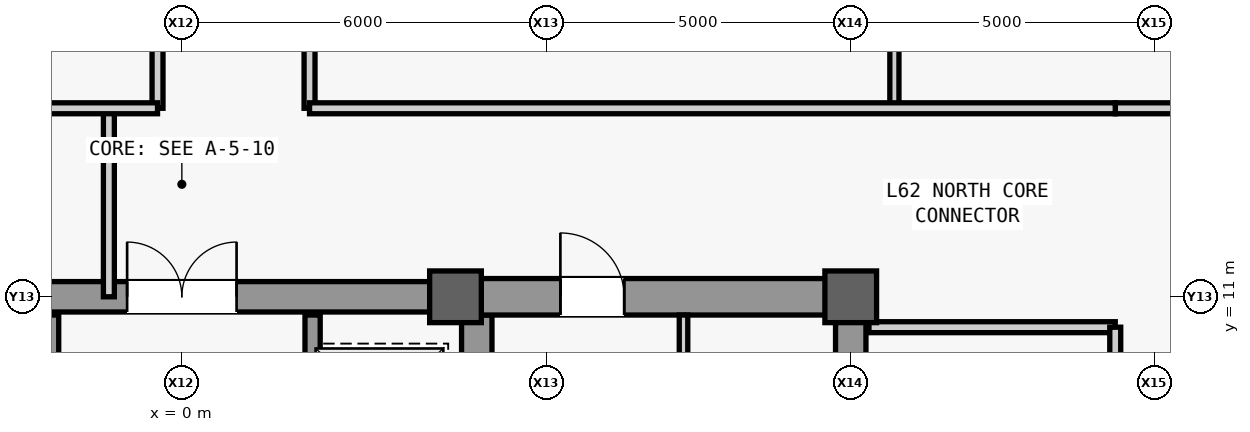
"""IFC4 building model, lengths in metres.
Left out: names, types, materials, properties, quantities, classifications, styles, units other than length and angle.
Written with IfcOpenShell. Run it as: python <this file> out.ifc"""

import sys

from ifc_helpers import new_model, si_unit, direction, frame, frame_2d, origin, origin_2d, place, context, subcontext, project, spatial, rectangle, extrude, source, transform, mapped, element, fill, save


model = new_model("IFC4")
c1 = context("Model", 3, precision=1e-05, world=origin(), true_north=direction((0.0, 1.0)))
c2 = subcontext(c1, "Body", "Model", "MODEL_VIEW")
j1 = project(units=[si_unit("LENGTHUNIT", "METRE"), si_unit("PLANEANGLEUNIT", "RADIAN")], contexts=[c1])
p1 = place(None, origin())
s1 = spatial("IfcSite", under=j1, at=p1, CompositionType="ELEMENT")
p2 = place(p1, origin())
s2 = spatial("IfcBuilding", under=s1, at=p2, CompositionType="ELEMENT")
p3 = place(p2, frame((0.0, 0.0, 263.1)))
s3 = spatial("IfcBuildingStorey", under=s2, at=p3, CompositionType="ELEMENT", Elevation=263.1)
m1 = source(origin(), c2, "Body", "SweptSolid", [
    extrude(rectangle(XDim=22.0, YDim=0.5, at=frame_2d((11.0, 0.0))), origin(), (0.0, 0.0, 1.0), 4.6),
])
p4 = place(p3, frame((11.0, -11.0, 0.0), z_axis=(0.0, 0.0, 1.0), x_axis=(0.0, 1.0, 0.0)))
e1 = element("IfcWall", 1, at=p4, inside=s3, PredefinedType="SHEAR", context=c2, shape_type="MappedRepresentation", body=[
    mapped(m1, transform((0.0, 0.0, 0.0), scale=1.0)),
])
m2 = source(origin(), c2, "Body", "SweptSolid", [
    extrude(rectangle(XDim=1.1, YDim=2.2, at=frame_2d((0.55, 1.1))), frame((0.0, 0.26, 0.0), z_axis=(0.0, -1.0, 0.0), x_axis=(1.0, 0.0, 0.0)), (0.0, 0.0, 1.0), 0.52),
])
p5 = place(p4, frame((0.8, 0.0, 0.0)))
e2 = element("IfcOpeningElement", 2, at=p5, cuts=e1, PredefinedType="OPENING", context=c2, shape_type="MappedRepresentation", body=[
    mapped(m2, transform((0.0, 0.0, 0.0), scale=1.0)),
])
m3 = source(origin(), c2, "Body", "SweptSolid", [
    extrude(rectangle(XDim=0.9, YDim=2.15, at=frame_2d((0.45, 1.075))), frame((0.0, 0.26, 0.0), z_axis=(0.0, -1.0, 0.0), x_axis=(1.0, 0.0, 0.0)), (0.0, 0.0, 1.0), 0.52),
])
p6 = place(p4, frame((6.85, 0.0, 0.0)))
e3 = element("IfcOpeningElement", 3, at=p6, cuts=e1, PredefinedType="OPENING", context=c2, shape_type="MappedRepresentation", body=[
    mapped(m3, transform((0.0, 0.0, 0.0), scale=1.0)),
])
m4 = source(origin(), c2, "Body", "SweptSolid", [
    extrude(rectangle(XDim=1.2, YDim=2.3, at=frame_2d((0.6, 1.15))), frame((0.0, 0.26, 0.0), z_axis=(0.0, -1.0, 0.0), x_axis=(1.0, 0.0, 0.0)), (0.0, 0.0, 1.0), 0.52),
])
p7 = place(p4, frame((17.6, 0.0, 0.0)))
e4 = element("IfcOpeningElement", 4, at=p7, cuts=e1, PredefinedType="OPENING", context=c2, shape_type="MappedRepresentation", body=[
    mapped(m4, transform((0.0, 0.0, 0.0), scale=1.0)),
])
p8 = place(p4, frame((19.6, 0.0, 0.0)))
e5 = element("IfcOpeningElement", 5, at=p8, cuts=e1, PredefinedType="OPENING", context=c2, shape_type="MappedRepresentation", body=[
    mapped(m4, transform((0.0, 0.0, 0.0), scale=1.0)),
])
m5 = source(origin(), c2, "Body", "SweptSolid", [
    extrude(rectangle(XDim=1.3, YDim=2.3, at=frame_2d((0.65, 1.15))), frame((0.0, 0.26, 0.0), z_axis=(0.0, -1.0, 0.0), x_axis=(1.0, 0.0, 0.0)), (0.0, 0.0, 1.0), 0.52),
])
p9 = place(p4, frame((2.7, 0.0, 0.0)))
e6 = element("IfcOpeningElement", 6, at=p9, cuts=e1, PredefinedType="OPENING", context=c2, shape_type="MappedRepresentation", body=[
    mapped(m5, transform((0.0, 0.0, 0.0), scale=1.0)),
])
p10 = place(p4, frame((13.35, 0.0, 0.0)))
e7 = element("IfcOpeningElement", 7, at=p10, cuts=e1, PredefinedType="OPENING", context=c2, shape_type="MappedRepresentation", body=[
    mapped(m5, transform((0.0, 0.0, 0.0), scale=1.0)),
])
m6 = source(origin(), c2, "Body", "SweptSolid", [
    extrude(rectangle(XDim=21.4, YDim=0.5, at=frame_2d((10.7, 0.0))), origin(), (0.0, 0.0, 1.0), 4.6),
])
p11 = place(p3, frame((4.85, -10.7, 0.0), z_axis=(0.0, 0.0, 1.0), x_axis=(0.0, 1.0, 0.0)))
e8 = element("IfcWall", 8, at=p11, inside=s3, PredefinedType="SHEAR", context=c2, shape_type="MappedRepresentation", body=[
    mapped(m6, transform((0.0, 0.0, 0.0), scale=1.0)),
])
m7 = source(origin(), c2, "Body", "SweptSolid", [
    extrude(rectangle(XDim=5.9, YDim=0.6, at=frame_2d((2.95, 0.0))), origin(), (0.0, 0.0, 1.0), 4.6),
])
p12 = place(p3, frame((4.85, 11.0, 0.0), z_axis=(0.0, 0.0, 1.0), x_axis=(1.0, 0.0, 0.0)))
e9 = element("IfcWall", 9, at=p12, inside=s3, PredefinedType="SHEAR", context=c2, shape_type="MappedRepresentation", body=[
    mapped(m7, transform((0.0, 0.0, 0.0), scale=1.0)),
])
m8 = source(origin(), c2, "Body", "SweptSolid", [
    extrude(rectangle(XDim=1.05, YDim=2.2, at=frame_2d((0.525, 1.1))), frame((0.0, 0.31, 0.0), z_axis=(0.0, -1.0, 0.0), x_axis=(1.0, 0.0, 0.0)), (0.0, 0.0, 1.0), 0.62),
])
p13 = place(p12, frame((1.375, 0.0, 0.0)))
e10 = element("IfcOpeningElement", 10, at=p13, cuts=e9, PredefinedType="OPENING", context=c2, shape_type="MappedRepresentation", body=[
    mapped(m8, transform((0.0, 0.0, 0.0), scale=1.0)),
])
m9 = source(origin(), c2, "Body", "SweptSolid", [
    extrude(rectangle(XDim=9.2, YDim=0.5, at=frame_2d((4.6, 0.0))), origin(), (0.0, 0.0, 1.0), 4.6),
])
p14 = place(p3, frame((-4.6, 11.0, 0.0), z_axis=(0.0, 0.0, 1.0), x_axis=(1.0, 0.0, 0.0)))
e11 = element("IfcWall", 11, at=p14, inside=s3, PredefinedType="SHEAR", context=c2, shape_type="MappedRepresentation", body=[
    mapped(m9, transform((0.0, 0.0, 0.0), scale=1.0)),
])
m10 = source(origin(), c2, "Body", "SweptSolid", [
    extrude(rectangle(XDim=1.8, YDim=2.25, at=frame_2d((0.9, 1.125))), frame((0.0, 0.26, 0.0), z_axis=(0.0, -1.0, 0.0), x_axis=(1.0, 0.0, 0.0)), (0.0, 0.0, 1.0), 0.52),
])
p15 = place(p14, frame((3.7, 0.0, 0.0)))
e12 = element("IfcOpeningElement", 12, at=p15, cuts=e11, PredefinedType="OPENING", context=c2, shape_type="MappedRepresentation", body=[
    mapped(m10, transform((0.0, 0.0, 0.0), scale=1.0)),
])
m11 = source(origin(), c2, "Body", "SweptSolid", [
    extrude(rectangle(XDim=0.85, YDim=0.85, at=origin_2d()), origin(), (0.0, 0.0, 1.0), 5.2),
])
for number, where, z_axis, x_axis in (
    (13, (4.5, 11.0, 0.0), (0.0, 0.0, 1.0), (1.0, 0.0, 0.0)),
    (14, (11.0, 11.0, 0.0), (0.0, 0.0, 1.0), (1.0, 0.0, 0.0)),
):
    element("IfcColumn", number, at=place(p3, frame(where, z_axis=z_axis, x_axis=x_axis)), inside=s3, PredefinedType="COLUMN", context=c2, shape_type="MappedRepresentation", body=[
        mapped(m11, transform((0.0, 0.0, 0.0), scale=1.0)),
    ])
m12 = source(origin(), c2, "Body", "SweptSolid", [
    extrude(rectangle(XDim=9.4, YDim=0.14, at=frame_2d((4.7, 0.0))), origin(), (0.0, 0.0, 1.0), 4.6),
])
p16 = place(p3, frame((8.25, 1.3, 0.0), z_axis=(0.0, 0.0, 1.0), x_axis=(0.0, 1.0, 0.0)))
e15 = element("IfcWall", 15, at=p16, inside=s3, PredefinedType="PARTITIONING", context=c2, shape_type="MappedRepresentation", body=[
    mapped(m12, transform((0.0, 0.0, 0.0), scale=1.0)),
])
m13 = source(origin(), c2, "Body", "SweptSolid", [
    extrude(rectangle(XDim=4.05, YDim=0.18, at=frame_2d((2.025, 0.0))), origin(), (0.0, 0.0, 1.0), 4.6),
])
p17 = place(p3, frame((11.3, 10.5, 0.0), z_axis=(0.0, 0.0, 1.0), x_axis=(1.0, 0.0, 0.0)))
e16 = element("IfcWall", 16, at=p17, inside=s3, PredefinedType="PARTITIONING", context=c2, shape_type="MappedRepresentation", body=[
    mapped(m13, transform((0.0, 0.0, 0.0), scale=1.0)),
])
m14 = source(origin(), c2, "Body", "SweptSolid", [
    extrude(rectangle(XDim=16.6, YDim=0.18, at=frame_2d((8.3, 0.0))), origin(), (0.0, 0.0, 1.0), 4.6),
])
p18 = place(p3, frame((15.35, -6.1, 0.0), z_axis=(0.0, 0.0, 1.0), x_axis=(0.0, 1.0, 0.0)))
e17 = element("IfcWall", 17, at=p18, inside=s3, PredefinedType="PARTITIONING", context=c2, shape_type="MappedRepresentation", body=[
    mapped(m14, transform((0.0, 0.0, 0.0), scale=1.0)),
])
m15 = source(origin(), c2, "Body", "SweptSolid", [
    extrude(rectangle(XDim=1.8, YDim=2.25, at=frame_2d((0.9, 1.125))), frame((0.0, 0.1, 0.0), z_axis=(0.0, -1.0, 0.0), x_axis=(1.0, 0.0, 0.0)), (0.0, 0.0, 1.0), 0.2),
])
p19 = place(p18, frame((2.7, 0.0, 0.0)))
e18 = element("IfcOpeningElement", 18, at=p19, cuts=e17, PredefinedType="OPENING", context=c2, shape_type="MappedRepresentation", body=[
    mapped(m15, transform((0.0, 0.0, 0.0), scale=1.0)),
])
p20 = place(p18, frame((13.0, 0.0, 0.0)))
e19 = element("IfcOpeningElement", 19, at=p20, cuts=e17, PredefinedType="OPENING", context=c2, shape_type="MappedRepresentation", body=[
    mapped(m15, transform((0.0, 0.0, 0.0), scale=1.0)),
])
m16 = source(origin(), c2, "Body", "SweptSolid", [
    extrude(rectangle(XDim=5.4, YDim=0.25, at=frame_2d((2.7, 0.0))), origin(), (0.0, 0.0, 1.0), 4.6),
])
p21 = place(p3, frame((-2.15, 5.3, 0.0), z_axis=(0.0, 0.0, 1.0), x_axis=(0.0, 1.0, 0.0)))
e20 = element("IfcWall", 20, at=p21, inside=s3, PredefinedType="SHEAR", context=c2, shape_type="MappedRepresentation", body=[
    mapped(m16, transform((0.0, 0.0, 0.0), scale=1.0)),
])
m17 = source(origin(), c2, "Body", "SweptSolid", [
    extrude(rectangle(XDim=1.2, YDim=2.3, at=frame_2d((0.6, 1.15))), frame((0.0, 0.135, 0.0), z_axis=(0.0, -1.0, 0.0), x_axis=(1.0, 0.0, 0.0)), (0.0, 0.0, 1.0), 0.27),
])
p22 = place(p21, frame((3.3, 0.0, 0.0)))
e21 = element("IfcOpeningElement", 21, at=p22, cuts=e20, PredefinedType="OPENING", context=c2, shape_type="MappedRepresentation", body=[
    mapped(m17, transform((0.0, 0.0, 0.0), scale=1.0)),
])
p23 = place(p21, frame((0.9, 0.0, 0.0)))
e22 = element("IfcOpeningElement", 22, at=p23, cuts=e20, PredefinedType="OPENING", context=c2, shape_type="MappedRepresentation", body=[
    mapped(m17, transform((0.0, 0.0, 0.0), scale=1.0)),
])
p24 = place(p3, frame((2.15, 5.3, 0.0), z_axis=(0.0, 0.0, 1.0), x_axis=(0.0, 1.0, 0.0)))
e23 = element("IfcWall", 23, at=p24, inside=s3, PredefinedType="SHEAR", context=c2, shape_type="MappedRepresentation", body=[
    mapped(m16, transform((0.0, 0.0, 0.0), scale=1.0)),
])
p25 = place(p24, frame((3.3, 0.0, 0.0)))
e24 = element("IfcOpeningElement", 24, at=p25, cuts=e23, PredefinedType="OPENING", context=c2, shape_type="MappedRepresentation", body=[
    mapped(m17, transform((0.0, 0.0, 0.0), scale=1.0)),
])
p26 = place(p24, frame((0.9, 0.0, 0.0)))
e25 = element("IfcOpeningElement", 25, at=p26, cuts=e23, PredefinedType="OPENING", context=c2, shape_type="MappedRepresentation", body=[
    mapped(m17, transform((0.0, 0.0, 0.0), scale=1.0)),
])
m18 = source(origin(), c2, "Body", "SweptSolid", [
    extrude(rectangle(XDim=2.45, YDim=0.18, at=frame_2d((1.225, 0.0))), origin(), (0.0, 0.0, 1.0), 4.6),
])
p27 = place(p3, frame((15.35, 14.1, 0.0), z_axis=(0.0, 0.0, 1.0), x_axis=(1.0, 0.0, 0.0)))
e26 = element("IfcWall", 26, at=p27, inside=s3, PredefinedType="PARTITIONING", context=c2, shape_type="MappedRepresentation", body=[
    mapped(m18, transform((0.0, 0.0, 0.0), scale=1.0)),
])
m19 = source(origin(), c2, "Body", "SweptSolid", [
    extrude(rectangle(XDim=3.1, YDim=0.18, at=frame_2d((1.55, 0.0))), origin(), (0.0, 0.0, 1.0), 4.6),
])
p28 = place(p3, frame((-1.2, 11.0, 0.0), z_axis=(0.0, 0.0, 1.0), x_axis=(0.0, 1.0, 0.0)))
e27 = element("IfcWall", 27, at=p28, inside=s3, PredefinedType="PARTITIONING", context=c2, shape_type="MappedRepresentation", body=[
    mapped(m19, transform((0.0, 0.0, 0.0), scale=1.0)),
])
m20 = source(origin(), c2, "Body", "SweptSolid", [
    extrude(rectangle(XDim=15.9, YDim=0.18, at=frame_2d((7.95, 0.0))), origin(), (0.0, 0.0, 1.0), 2.8),
])
p29 = place(p3, frame((-0.4, 14.1, 0.0), z_axis=(0.0, 0.0, 1.0), x_axis=(0.0, 1.0, 0.0)))
e28 = element("IfcWall", 28, at=p29, inside=s3, PredefinedType="PARTITIONING", context=c2, shape_type="MappedRepresentation", body=[
    mapped(m20, transform((0.0, 0.0, 0.0), scale=1.0)),
])
m21 = source(origin(), c2, "Body", "SweptSolid", [
    extrude(rectangle(XDim=1.05, YDim=2.2, at=frame_2d((0.525, 1.1))), frame((0.0, 0.1, 0.0), z_axis=(0.0, -1.0, 0.0), x_axis=(1.0, 0.0, 0.0)), (0.0, 0.0, 1.0), 0.2),
])
p30 = place(p29, frame((11.4, 0.0, 0.0)))
e29 = element("IfcOpeningElement", 29, at=p30, cuts=e28, PredefinedType="OPENING", context=c2, shape_type="MappedRepresentation", body=[
    mapped(m21, transform((0.0, 0.0, 0.0), scale=1.0)),
])
m22 = source(origin(), c2, "Body", "SweptSolid", [
    extrude(rectangle(XDim=14.95, YDim=0.18, at=frame_2d((7.475, 0.0))), origin(), (0.0, 0.0, 1.0), 4.6),
])
p31 = place(p3, frame((-15.35, 14.1, 0.0), z_axis=(0.0, 0.0, 1.0), x_axis=(1.0, 0.0, 0.0)))
e30 = element("IfcWall", 30, at=p31, inside=s3, PredefinedType="PARTITIONING", context=c2, shape_type="MappedRepresentation", body=[
    mapped(m22, transform((0.0, 0.0, 0.0), scale=1.0)),
])
m23 = source(origin(), c2, "Body", "SweptSolid", [
    extrude(rectangle(XDim=15.9, YDim=0.15, at=frame_2d((7.95, 0.0))), origin(), (0.0, 0.0, 1.0), 4.6),
])
p32 = place(p3, frame((11.718, 14.1, 0.0), z_axis=(0.0, 0.0, 1.0), x_axis=(0.0, 1.0, 0.0)))
e31 = element("IfcWall", 31, at=p32, inside=s3, PredefinedType="PARTITIONING", context=c2, shape_type="MappedRepresentation", body=[
    mapped(m23, transform((0.0, 0.0, 0.0), scale=1.0)),
])
m24 = source(origin(), c2, "Body", "SweptSolid", [
    extrude(rectangle(XDim=0.95, YDim=2.15, at=frame_2d((0.475, 1.075))), frame((0.0, 0.085, 0.0), z_axis=(0.0, -1.0, 0.0), x_axis=(1.0, 0.0, 0.0)), (0.0, 0.0, 1.0), 0.17),
])
p33 = place(p32, frame((11.45, 0.0, 0.0)))
e32 = element("IfcOpeningElement", 32, at=p33, cuts=e31, PredefinedType="OPENING", context=c2, shape_type="MappedRepresentation", body=[
    mapped(m24, transform((0.0, 0.0, 0.0), scale=1.0)),
])
m25 = source(origin(), c2, "Body", "SweptSolid", [
    extrude(rectangle(XDim=15.9, YDim=0.18, at=frame_2d((7.95, 0.0))), origin(), (0.0, 0.0, 1.0), 4.6),
])
p34 = place(p3, frame((2.1, 14.1, 0.0), z_axis=(0.0, 0.0, 1.0), x_axis=(0.0, 1.0, 0.0)))
e33 = element("IfcWall", 33, at=p34, inside=s3, PredefinedType="PARTITIONING", context=c2, shape_type="MappedRepresentation", body=[
    mapped(m25, transform((0.0, 0.0, 0.0), scale=1.0)),
])
p35 = place(p34, frame((11.4, 0.0, 0.0)))
e34 = element("IfcOpeningElement", 34, at=p35, cuts=e33, PredefinedType="OPENING", context=c2, shape_type="MappedRepresentation", body=[
    mapped(m21, transform((0.0, 0.0, 0.0), scale=1.0)),
])
m26 = source(origin(), c2, "Body", "SweptSolid", [
    extrude(rectangle(XDim=13.25, YDim=0.18, at=frame_2d((6.625, 0.0))), origin(), (0.0, 0.0, 1.0), 4.6),
])
p36 = place(p3, frame((2.1, 14.1, 0.0), z_axis=(0.0, 0.0, 1.0), x_axis=(1.0, 0.0, 0.0)))
e35 = element("IfcWall", 35, at=p36, inside=s3, PredefinedType="PARTITIONING", context=c2, shape_type="MappedRepresentation", body=[
    mapped(m26, transform((0.0, 0.0, 0.0), scale=1.0)),
])
m27 = source(origin(), c2, "Body", "SweptSolid", [
    extrude(rectangle(XDim=1.05, YDim=2.2, at=frame_2d((0.525, 1.1))), frame((0.0, 0.025, 0.0), z_axis=(0.0, -1.0, 0.0), x_axis=(1.0, 0.0, 0.0)), (0.0, 0.0, 1.0), 0.05),
])
p37 = place(p13, origin())
e36 = element("IfcDoor", 36, at=p37, inside=s3, OperationType="SINGLE_SWING_LEFT", PredefinedType="DOOR", context=c2, shape_type="MappedRepresentation", body=[
    mapped(m27, transform((0.0, 0.0, 0.0), scale=1.0)),
])
fill(e10, e36)
m28 = source(origin(), c2, "Body", "SweptSolid", [
    extrude(rectangle(XDim=1.8, YDim=2.25, at=frame_2d((0.9, 1.125))), frame((0.0, 0.025, 0.0), z_axis=(0.0, -1.0, 0.0), x_axis=(1.0, 0.0, 0.0)), (0.0, 0.0, 1.0), 0.05),
])
p38 = place(p15, origin())
e37 = element("IfcDoor", 37, at=p38, inside=s3, OperationType="SINGLE_SWING_RIGHT", PredefinedType="DOOR", context=c2, shape_type="MappedRepresentation", body=[
    mapped(m28, transform((0.0, 0.0, 0.0), scale=1.0)),
])
fill(e12, e37)
save(model, sys.argv[1])
